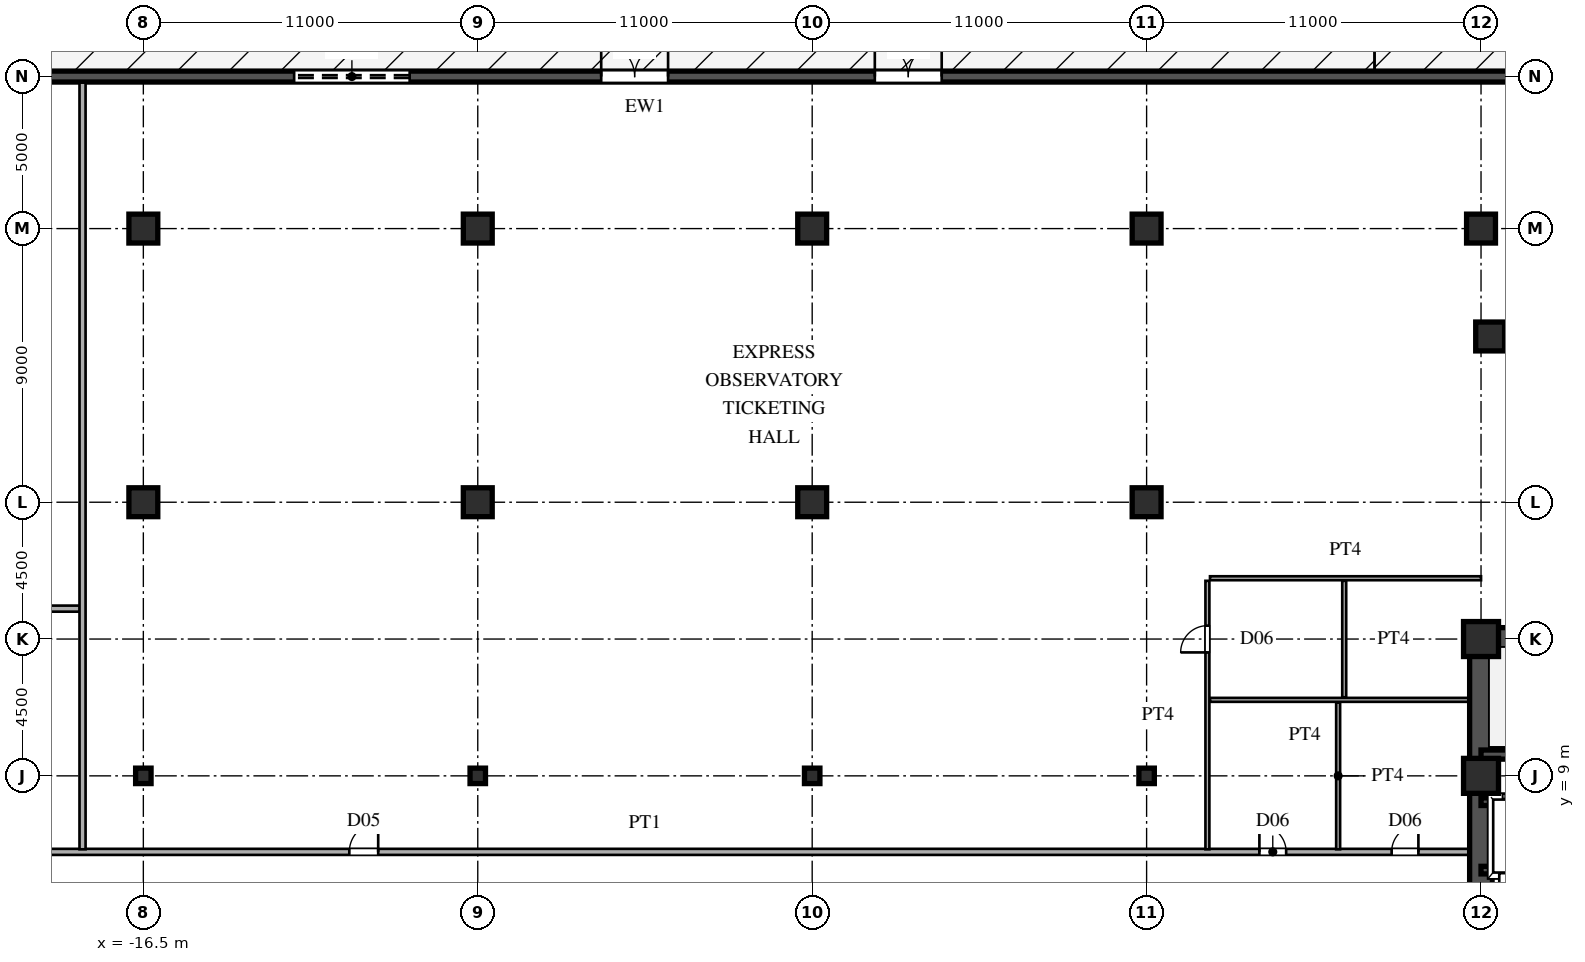
"""IFC4 building model, lengths in metres.
Left out: names, types, materials, properties, quantities, classifications, styles, units other than length and angle.
Written with IfcOpenShell. Run it as: python <this file> out.ifc"""

import sys

from ifc_helpers import new_model, si_unit, direction, frame, frame_2d, origin, origin_2d, place, context, subcontext, project, spatial, rectangle, hollow_rectangle, hollow_circle, extrude, source, transform, mapped, element, fill, save


model = new_model("IFC4")
c1 = context("Model", 3, precision=1e-05, world=origin(), true_north=direction((0.0, 1.0)))
c2 = subcontext(c1, "Body", "Model", "MODEL_VIEW")
j1 = project(units=[si_unit("LENGTHUNIT", "METRE"), si_unit("PLANEANGLEUNIT", "RADIAN")], contexts=[c1])
p1 = place(None, origin())
s1 = spatial("IfcSite", under=j1, at=p1, CompositionType="ELEMENT")
p2 = place(p1, origin())
s2 = spatial("IfcBuilding", under=s1, at=p2, CompositionType="ELEMENT")
p3 = place(p2, origin())
s3 = spatial("IfcBuildingStorey", under=s2, at=p3, CompositionType="ELEMENT", Elevation=0.0)
m1 = source(origin(), c2, "Body", "SweptSolid", [
    extrude(hollow_rectangle(XDim=1.15, YDim=1.15, WallThickness=0.048, at=origin_2d()), origin(), (0.0, 0.0, 1.0), 5.4),
])
for number, where, z_axis, x_axis in (
    (1, (27.5, 9.0, 0.0), (0.0, 0.0, 1.0), (1.0, 0.0, 0.0)),
    (2, (27.5, 13.5, 0.0), (0.0, 0.0, 1.0), (1.0, 0.0, 0.0)),
):
    element("IfcColumn", number, at=place(p3, frame(where, z_axis=z_axis, x_axis=x_axis)), inside=s3, PredefinedType="COLUMN", context=c2, shape_type="MappedRepresentation", body=[
        mapped(m1, transform((0.0, 0.0, 0.0), scale=1.0)),
    ])
m2 = source(origin(), c2, "Body", "SweptSolid", [
    extrude(rectangle(XDim=0.95, YDim=0.95, at=origin_2d()), origin(), (0.0, 0.0, 1.0), 5.4),
])
for number, where, z_axis, x_axis in (
    (3, (27.5, 27.0, 0.0), (0.0, 0.0, 1.0), (1.0, 0.0, 0.0)),
    (4, (27.8, 23.451, 0.0), (0.0, 0.0, 1.0), (1.0, 0.0, 0.0)),
):
    element("IfcColumn", number, at=place(p3, frame(where, z_axis=z_axis, x_axis=x_axis)), inside=s3, PredefinedType="COLUMN", context=c2, shape_type="MappedRepresentation", body=[
        mapped(m2, transform((0.0, 0.0, 0.0), scale=1.0)),
    ])
m3 = source(origin(), c2, "Body", "SweptSolid", [
    extrude(hollow_circle(Radius=0.254, WallThickness=0.019, at=origin_2d()), origin(), (0.0, 0.0, 1.0), 5.4),
])
p4 = place(p3, frame((-16.5, 9.0, 0.0), z_axis=(0.0, 0.0, 1.0), x_axis=(1.0, 0.0, 0.0)))
e5 = element("IfcColumn", 5, at=p4, inside=s3, PredefinedType="COLUMN", context=c2, shape_type="MappedRepresentation", body=[
    mapped(m3, transform((0.0, 0.0, 0.0), scale=1.0)),
])
for number, where, z_axis, x_axis in (
    (6, (-16.5, 18.0, 0.0), (0.0, 0.0, 1.0), (1.0, 0.0, 0.0)),
    (7, (-16.5, 27.0, 0.0), (0.0, 0.0, 1.0), (1.0, 0.0, 0.0)),
):
    element("IfcColumn", number, at=place(p3, frame(where, z_axis=z_axis, x_axis=x_axis)), inside=s3, PredefinedType="COLUMN", context=c2, shape_type="MappedRepresentation", body=[
        mapped(m2, transform((0.0, 0.0, 0.0), scale=1.0)),
    ])
p5 = place(p3, frame((-5.5, 9.0, 0.0), z_axis=(0.0, 0.0, 1.0), x_axis=(1.0, 0.0, 0.0)))
e8 = element("IfcColumn", 8, at=p5, inside=s3, PredefinedType="COLUMN", context=c2, shape_type="MappedRepresentation", body=[
    mapped(m3, transform((0.0, 0.0, 0.0), scale=1.0)),
])
for number, where, z_axis, x_axis in (
    (9, (-5.5, 18.0, 0.0), (0.0, 0.0, 1.0), (1.0, 0.0, 0.0)),
    (10, (-5.5, 27.0, 0.0), (0.0, 0.0, 1.0), (1.0, 0.0, 0.0)),
):
    element("IfcColumn", number, at=place(p3, frame(where, z_axis=z_axis, x_axis=x_axis)), inside=s3, PredefinedType="COLUMN", context=c2, shape_type="MappedRepresentation", body=[
        mapped(m2, transform((0.0, 0.0, 0.0), scale=1.0)),
    ])
p6 = place(p3, frame((5.5, 9.0, 0.0), z_axis=(0.0, 0.0, 1.0), x_axis=(1.0, 0.0, 0.0)))
e11 = element("IfcColumn", 11, at=p6, inside=s3, PredefinedType="COLUMN", context=c2, shape_type="MappedRepresentation", body=[
    mapped(m3, transform((0.0, 0.0, 0.0), scale=1.0)),
])
for number, where, z_axis, x_axis in (
    (12, (5.5, 18.0, 0.0), (0.0, 0.0, 1.0), (1.0, 0.0, 0.0)),
    (13, (5.5, 27.0, 0.0), (0.0, 0.0, 1.0), (1.0, 0.0, 0.0)),
):
    element("IfcColumn", number, at=place(p3, frame(where, z_axis=z_axis, x_axis=x_axis)), inside=s3, PredefinedType="COLUMN", context=c2, shape_type="MappedRepresentation", body=[
        mapped(m2, transform((0.0, 0.0, 0.0), scale=1.0)),
    ])
p7 = place(p3, frame((16.5, 9.0, 0.0), z_axis=(0.0, 0.0, 1.0), x_axis=(1.0, 0.0, 0.0)))
e14 = element("IfcColumn", 14, at=p7, inside=s3, PredefinedType="COLUMN", context=c2, shape_type="MappedRepresentation", body=[
    mapped(m3, transform((0.0, 0.0, 0.0), scale=1.0)),
])
for number, where, z_axis, x_axis in (
    (15, (16.5, 18.0, 0.0), (0.0, 0.0, 1.0), (1.0, 0.0, 0.0)),
    (16, (16.5, 27.0, 0.0), (0.0, 0.0, 1.0), (1.0, 0.0, 0.0)),
):
    element("IfcColumn", number, at=place(p3, frame(where, z_axis=z_axis, x_axis=x_axis)), inside=s3, PredefinedType="COLUMN", context=c2, shape_type="MappedRepresentation", body=[
        mapped(m2, transform((0.0, 0.0, 0.0), scale=1.0)),
    ])
p8 = place(p3, frame((71.96, 32.0, 0.0), z_axis=(0.0, 0.0, 1.0), x_axis=(-1.0, 0.0, 0.0)))
e17 = element("IfcWall", 17, at=p8, inside=s3, PredefinedType="SOLIDWALL", context=c2, shape_type="SweptSolid", body=[
    extrude(rectangle(XDim=143.92, YDim=0.36, at=frame_2d((71.96, 0.0))), origin(), (0.0, 0.0, 1.0), 5.12),
])
p9 = place(p8, frame((18.0, 0.0, 0.0)))
e18 = element("IfcOpeningElement", 18, at=p9, cuts=e17, PredefinedType="OPENING", context=c2, shape_type="SweptSolid", body=[
    extrude(rectangle(XDim=2.2, YDim=2.4, at=frame_2d((1.1, 1.2))), frame((0.0, 0.19, 0.0), z_axis=(0.0, -1.0, 0.0), x_axis=(1.0, 0.0, 0.0)), (0.0, 0.0, 1.0), 0.38),
])
p10 = place(p8, frame((62.2, 0.0, 0.0)))
e19 = element("IfcOpeningElement", 19, at=p10, cuts=e17, PredefinedType="OPENING", context=c2, shape_type="SweptSolid", body=[
    extrude(rectangle(XDim=2.2, YDim=2.4, at=frame_2d((1.1, 1.2))), frame((0.0, 0.19, 0.0), z_axis=(0.0, -1.0, 0.0), x_axis=(1.0, 0.0, 0.0)), (0.0, 0.0, 1.0), 0.38),
])
p11 = place(p8, frame((71.2, 0.0, 0.0)))
e20 = element("IfcOpeningElement", 20, at=p11, cuts=e17, PredefinedType="OPENING", context=c2, shape_type="SweptSolid", body=[
    extrude(rectangle(XDim=2.2, YDim=2.4, at=frame_2d((1.1, 1.2))), frame((0.0, 0.19, 0.0), z_axis=(0.0, -1.0, 0.0), x_axis=(1.0, 0.0, 0.0)), (0.0, 0.0, 1.0), 0.38),
])
p12 = place(p8, frame((79.7, 0.0, 0.0)))
e21 = element("IfcOpeningElement", 21, at=p12, cuts=e17, PredefinedType="OPENING", context=c2, shape_type="SweptSolid", body=[
    extrude(rectangle(XDim=3.8, YDim=3.1, at=frame_2d((1.9, 1.55))), frame((0.0, 0.19, 0.0), z_axis=(0.0, -1.0, 0.0), x_axis=(1.0, 0.0, 0.0)), (0.0, 0.0, 1.0), 0.38),
])
p13 = place(p8, frame((93.2, 0.0, 0.0)))
e22 = element("IfcOpeningElement", 22, at=p13, cuts=e17, PredefinedType="OPENING", context=c2, shape_type="SweptSolid", body=[
    extrude(rectangle(XDim=1.2, YDim=2.2, at=frame_2d((0.6, 1.1))), frame((0.0, 0.19, 0.0), z_axis=(0.0, -1.0, 0.0), x_axis=(1.0, 0.0, 0.0)), (0.0, 0.0, 1.0), 0.38),
])
p14 = place(p8, frame((120.2, 0.0, 0.0)))
e23 = element("IfcOpeningElement", 23, at=p14, cuts=e17, PredefinedType="OPENING", context=c2, shape_type="SweptSolid", body=[
    extrude(rectangle(XDim=2.2, YDim=2.4, at=frame_2d((1.1, 1.2))), frame((0.0, 0.19, 0.0), z_axis=(0.0, -1.0, 0.0), x_axis=(1.0, 0.0, 0.0)), (0.0, 0.0, 1.0), 0.38),
])
p15 = place(p8, frame((95.7, 0.0, 0.95)))
e24 = element("IfcOpeningElement", 24, at=p15, cuts=e17, PredefinedType="OPENING", context=c2, shape_type="SweptSolid", body=[
    extrude(rectangle(XDim=1.2, YDim=1.7, at=frame_2d((0.6, 0.85))), frame((0.0, 0.19, 0.0), z_axis=(0.0, -1.0, 0.0), x_axis=(1.0, 0.0, 0.0)), (0.0, 0.0, 1.0), 0.38),
])
p16 = place(p8, frame((8.0, 0.0, 0.95)))
e25 = element("IfcOpeningElement", 25, at=p16, cuts=e17, PredefinedType="OPENING", context=c2, shape_type="SweptSolid", body=[
    extrude(rectangle(XDim=1.5, YDim=1.9, at=frame_2d((0.75, 0.95))), frame((0.0, 0.19, 0.0), z_axis=(0.0, -1.0, 0.0), x_axis=(1.0, 0.0, 0.0)), (0.0, 0.0, 1.0), 0.38),
])
p17 = place(p8, frame((28.0, 0.0, 0.95)))
e26 = element("IfcOpeningElement", 26, at=p17, cuts=e17, PredefinedType="OPENING", context=c2, shape_type="SweptSolid", body=[
    extrude(rectangle(XDim=1.5, YDim=1.9, at=frame_2d((0.75, 0.95))), frame((0.0, 0.19, 0.0), z_axis=(0.0, -1.0, 0.0), x_axis=(1.0, 0.0, 0.0)), (0.0, 0.0, 1.0), 0.38),
])
p18 = place(p8, frame((36.0, 0.0, 0.95)))
e27 = element("IfcOpeningElement", 27, at=p18, cuts=e17, PredefinedType="OPENING", context=c2, shape_type="SweptSolid", body=[
    extrude(rectangle(XDim=1.5, YDim=1.9, at=frame_2d((0.75, 0.95))), frame((0.0, 0.19, 0.0), z_axis=(0.0, -1.0, 0.0), x_axis=(1.0, 0.0, 0.0)), (0.0, 0.0, 1.0), 0.38),
])
p19 = place(p8, frame((104.0, 0.0, 0.95)))
e28 = element("IfcOpeningElement", 28, at=p19, cuts=e17, PredefinedType="OPENING", context=c2, shape_type="SweptSolid", body=[
    extrude(rectangle(XDim=1.5, YDim=1.9, at=frame_2d((0.75, 0.95))), frame((0.0, 0.19, 0.0), z_axis=(0.0, -1.0, 0.0), x_axis=(1.0, 0.0, 0.0)), (0.0, 0.0, 1.0), 0.38),
])
p20 = place(p8, frame((112.0, 0.0, 0.95)))
e29 = element("IfcOpeningElement", 29, at=p20, cuts=e17, PredefinedType="OPENING", context=c2, shape_type="SweptSolid", body=[
    extrude(rectangle(XDim=1.5, YDim=1.9, at=frame_2d((0.75, 0.95))), frame((0.0, 0.19, 0.0), z_axis=(0.0, -1.0, 0.0), x_axis=(1.0, 0.0, 0.0)), (0.0, 0.0, 1.0), 0.38),
])
p21 = place(p8, frame((130.0, 0.0, 0.95)))
e30 = element("IfcOpeningElement", 30, at=p21, cuts=e17, PredefinedType="OPENING", context=c2, shape_type="SweptSolid", body=[
    extrude(rectangle(XDim=1.5, YDim=1.9, at=frame_2d((0.75, 0.95))), frame((0.0, 0.19, 0.0), z_axis=(0.0, -1.0, 0.0), x_axis=(1.0, 0.0, 0.0)), (0.0, 0.0, 1.0), 0.38),
])
p22 = place(p3, frame((27.5, 1.3, 0.0), z_axis=(0.0, 0.0, 1.0), x_axis=(0.0, 1.0, 0.0)))
e31 = element("IfcWall", 31, at=p22, inside=s3, PredefinedType="SHEAR", context=c2, shape_type="SweptSolid", body=[
    extrude(rectangle(XDim=12.2, YDim=0.75, at=frame_2d((6.1, 0.0))), origin(), (0.0, 0.0, 1.0), 5.12),
])
p23 = place(p3, frame((27.5, 13.5, 0.0), z_axis=(0.0, 0.0, 1.0), x_axis=(1.0, 0.0, 0.0)))
e32 = element("IfcWall", 32, at=p23, inside=s3, PredefinedType="SHEAR", context=c2, shape_type="SweptSolid", body=[
    extrude(rectangle(XDim=9.0, YDim=0.75, at=frame_2d((4.5, 0.0))), origin(), (0.0, 0.0, 1.0), 5.12),
])
p24 = place(p3, frame((27.5, 9.7, 0.0), z_axis=(0.0, 0.0, 1.0), x_axis=(1.0, 0.0, 0.0)))
e33 = element("IfcWall", 33, at=p24, inside=s3, PredefinedType="SHEAR", context=c2, shape_type="SweptSolid", body=[
    extrude(rectangle(XDim=9.0, YDim=0.3, at=frame_2d((4.5, 0.0))), origin(), (0.0, 0.0, 1.0), 5.12),
])
p25 = place(p24, frame((7.3, 0.0, 0.0)))
e34 = element("IfcOpeningElement", 34, at=p25, cuts=e33, PredefinedType="OPENING", context=c2, shape_type="SweptSolid", body=[
    extrude(rectangle(XDim=1.1, YDim=2.2, at=frame_2d((0.55, 1.1))), frame((0.0, 0.16, 0.0), z_axis=(0.0, -1.0, 0.0), x_axis=(1.0, 0.0, 0.0)), (0.0, 0.0, 1.0), 0.32),
])
for number, where, z_axis, x_axis in (
    (35, (27.5, 5.9, 0.0), (0.0, 0.0, 1.0), (1.0, 0.0, 0.0)),
    (36, (27.5, 8.15, 0.0), (0.0, 0.0, 1.0), (1.0, 0.0, 0.0)),
):
    element("IfcWall", number, at=place(p3, frame(where, z_axis=z_axis, x_axis=x_axis)), inside=s3, PredefinedType="SHEAR", context=c2, shape_type="SweptSolid", body=[
        extrude(rectangle(XDim=2.8, YDim=0.25, at=frame_2d((1.4, 0.0))), origin(), (0.0, 0.0, 1.0), 5.12),
    ])
p26 = place(p3, frame((-27.12, 6.5, 0.0), z_axis=(0.0, 0.0, 1.0), x_axis=(1.0, 0.0, 0.0)))
e37 = element("IfcWall", 37, at=p26, inside=s3, PredefinedType="PARTITIONING", context=c2, shape_type="SweptSolid", body=[
    extrude(rectangle(XDim=54.24, YDim=0.2, at=frame_2d((27.12, 0.0))), origin(), (0.0, 0.0, 1.0), 5.12),
])
p27 = place(p26, frame((4.045, 0.0, 0.0)))
e38 = element("IfcOpeningElement", 38, at=p27, cuts=e37, PredefinedType="OPENING", context=c2, shape_type="SweptSolid", body=[
    extrude(rectangle(XDim=1.15, YDim=2.2, at=frame_2d((0.575, 1.1))), frame((0.0, 0.11, 0.0), z_axis=(0.0, -1.0, 0.0), x_axis=(1.0, 0.0, 0.0)), (0.0, 0.0, 1.0), 0.22),
])
p28 = place(p26, frame((17.395, 0.0, 0.0)))
e39 = element("IfcOpeningElement", 39, at=p28, cuts=e37, PredefinedType="OPENING", context=c2, shape_type="SweptSolid", body=[
    extrude(rectangle(XDim=0.95, YDim=2.15, at=frame_2d((0.475, 1.075))), frame((0.0, 0.11, 0.0), z_axis=(0.0, -1.0, 0.0), x_axis=(1.0, 0.0, 0.0)), (0.0, 0.0, 1.0), 0.22),
])
p29 = place(p26, frame((47.33, 0.0, 0.0)))
e40 = element("IfcOpeningElement", 40, at=p29, cuts=e37, PredefinedType="OPENING", context=c2, shape_type="SweptSolid", body=[
    extrude(rectangle(XDim=0.88, YDim=2.1, at=frame_2d((0.44, 1.05))), frame((0.0, 0.11, 0.0), z_axis=(0.0, -1.0, 0.0), x_axis=(1.0, 0.0, 0.0)), (0.0, 0.0, 1.0), 0.22),
])
p30 = place(p26, frame((51.68, 0.0, 0.0)))
e41 = element("IfcOpeningElement", 41, at=p30, cuts=e37, PredefinedType="OPENING", context=c2, shape_type="SweptSolid", body=[
    extrude(rectangle(XDim=0.88, YDim=2.1, at=frame_2d((0.44, 1.05))), frame((0.0, 0.11, 0.0), z_axis=(0.0, -1.0, 0.0), x_axis=(1.0, 0.0, 0.0)), (0.0, 0.0, 1.0), 0.22),
])
p31 = place(p3, frame((18.585, 11.5, 0.0), z_axis=(0.0, 0.0, 1.0), x_axis=(1.0, 0.0, 0.0)))
e42 = element("IfcWall", 42, at=p31, inside=s3, PredefinedType="PARTITIONING", context=c2, shape_type="SweptSolid", body=[
    extrude(rectangle(XDim=8.535, YDim=0.13, at=frame_2d((4.268, 0.0))), origin(), (0.0, 0.0, 1.0), 5.12),
])
p32 = place(p3, frame((-27.5, 14.5, 0.0), z_axis=(0.0, 0.0, 1.0), x_axis=(1.0, 0.0, 0.0)))
e43 = element("IfcWall", 43, at=p32, inside=s3, PredefinedType="PARTITIONING", context=c2, shape_type="SweptSolid", body=[
    extrude(rectangle(XDim=8.915, YDim=0.2, at=frame_2d((4.458, 0.0))), origin(), (0.0, 0.0, 1.0), 5.12),
])
p33 = place(p3, frame((18.585, 15.5, 0.0), z_axis=(0.0, 0.0, 1.0), x_axis=(1.0, 0.0, 0.0)))
e44 = element("IfcWall", 44, at=p33, inside=s3, PredefinedType="PARTITIONING", context=c2, shape_type="SweptSolid", body=[
    extrude(rectangle(XDim=8.915, YDim=0.13, at=frame_2d((4.458, 0.0))), origin(), (0.0, 0.0, 1.0), 5.12),
])
p34 = place(p3, frame((-18.5, 6.585, 0.0), z_axis=(0.0, 0.0, 1.0), x_axis=(0.0, 1.0, 0.0)))
e45 = element("IfcWall", 45, at=p34, inside=s3, PredefinedType="PARTITIONING", context=c2, shape_type="SweptSolid", body=[
    extrude(rectangle(XDim=25.215, YDim=0.2, at=frame_2d((12.607, 0.0))), origin(), (0.0, 0.0, 1.0), 5.12),
])
p35 = place(p3, frame((18.5, 6.585, 0.0), z_axis=(0.0, 0.0, 1.0), x_axis=(0.0, 1.0, 0.0)))
e46 = element("IfcWall", 46, at=p35, inside=s3, PredefinedType="PARTITIONING", context=c2, shape_type="SweptSolid", body=[
    extrude(rectangle(XDim=8.83, YDim=0.13, at=frame_2d((4.415, 0.0))), origin(), (0.0, 0.0, 1.0), 5.12),
])
p36 = place(p35, frame((6.475, 0.0, 0.0)))
e47 = element("IfcOpeningElement", 47, at=p36, cuts=e46, PredefinedType="OPENING", context=c2, shape_type="SweptSolid", body=[
    extrude(rectangle(XDim=0.88, YDim=2.1, at=frame_2d((0.44, 1.05))), frame((0.0, 0.075, 0.0), z_axis=(0.0, -1.0, 0.0), x_axis=(1.0, 0.0, 0.0)), (0.0, 0.0, 1.0), 0.15),
])
p37 = place(p3, frame((22.8, 6.585, 0.0), z_axis=(0.0, 0.0, 1.0), x_axis=(0.0, 1.0, 0.0)))
e48 = element("IfcWall", 48, at=p37, inside=s3, PredefinedType="PARTITIONING", context=c2, shape_type="SweptSolid", body=[
    extrude(rectangle(XDim=4.83, YDim=0.13, at=frame_2d((2.415, 0.0))), origin(), (0.0, 0.0, 1.0), 5.12),
])
p38 = place(p3, frame((23.0, 11.585, 0.0), z_axis=(0.0, 0.0, 1.0), x_axis=(0.0, 1.0, 0.0)))
e49 = element("IfcWall", 49, at=p38, inside=s3, PredefinedType="PARTITIONING", context=c2, shape_type="SweptSolid", body=[
    extrude(rectangle(XDim=3.83, YDim=0.13, at=frame_2d((1.915, 0.0))), origin(), (0.0, 0.0, 1.0), 5.12),
])
m4 = source(origin(), c2, "Body", "SweptSolid", [
    extrude(rectangle(XDim=2.2, YDim=2.4, at=frame_2d((1.1, 1.2))), frame((0.0, 0.025, 0.0), z_axis=(0.0, -1.0, 0.0), x_axis=(1.0, 0.0, 0.0)), (0.0, 0.0, 1.0), 0.05),
])
p39 = place(p10, frame((2.2, 0.0, 0.0), z_axis=(0.0, 0.0, 1.0), x_axis=(-1.0, 0.0, 0.0)))
e50 = element("IfcDoor", 50, at=p39, inside=s3, OperationType="DOUBLE_SWING_LEFT", PredefinedType="DOOR", context=c2, shape_type="MappedRepresentation", body=[
    mapped(m4, transform((0.0, 0.0, 0.0), scale=1.0)),
])
fill(e19, e50)
p40 = place(p11, frame((2.2, 0.0, 0.0), z_axis=(0.0, 0.0, 1.0), x_axis=(-1.0, 0.0, 0.0)))
e51 = element("IfcDoor", 51, at=p40, inside=s3, OperationType="DOUBLE_SWING_LEFT", PredefinedType="DOOR", context=c2, shape_type="MappedRepresentation", body=[
    mapped(m4, transform((0.0, 0.0, 0.0), scale=1.0)),
])
fill(e20, e51)
m5 = source(origin(), c2, "Body", "SweptSolid", [
    extrude(rectangle(XDim=3.8, YDim=3.1, at=frame_2d((1.9, 1.55))), frame((0.0, 0.025, 0.0), z_axis=(0.0, -1.0, 0.0), x_axis=(1.0, 0.0, 0.0)), (0.0, 0.0, 1.0), 0.05),
])
p41 = place(p12, frame((3.8, 0.0, 0.0), z_axis=(0.0, 0.0, 1.0), x_axis=(-1.0, 0.0, 0.0)))
e52 = element("IfcDoor", 52, at=p41, inside=s3, OperationType="ROLLINGUP", PredefinedType="GATE", context=c2, shape_type="MappedRepresentation", body=[
    mapped(m5, transform((0.0, 0.0, 0.0), scale=1.0)),
])
fill(e21, e52)
m6 = source(origin(), c2, "Body", "SweptSolid", [
    extrude(rectangle(XDim=0.95, YDim=2.15, at=frame_2d((0.475, 1.075))), frame((0.0, 0.025, 0.0), z_axis=(0.0, -1.0, 0.0), x_axis=(1.0, 0.0, 0.0)), (0.0, 0.0, 1.0), 0.05),
])
p42 = place(p28, origin())
e53 = element("IfcDoor", 53, at=p42, inside=s3, OperationType="SINGLE_SWING_RIGHT", PredefinedType="DOOR", context=c2, shape_type="MappedRepresentation", body=[
    mapped(m6, transform((0.0, 0.0, 0.0), scale=1.0)),
])
fill(e39, e53)
m7 = source(origin(), c2, "Body", "SweptSolid", [
    extrude(rectangle(XDim=0.88, YDim=2.1, at=frame_2d((0.44, 1.05))), frame((0.0, 0.025, 0.0), z_axis=(0.0, -1.0, 0.0), x_axis=(1.0, 0.0, 0.0)), (0.0, 0.0, 1.0), 0.05),
])
p43 = place(p29, origin())
e54 = element("IfcDoor", 54, at=p43, inside=s3, OperationType="SINGLE_SWING_LEFT", PredefinedType="DOOR", context=c2, shape_type="MappedRepresentation", body=[
    mapped(m7, transform((0.0, 0.0, 0.0), scale=1.0)),
])
fill(e40, e54)
p44 = place(p30, origin())
e55 = element("IfcDoor", 55, at=p44, inside=s3, OperationType="SINGLE_SWING_RIGHT", PredefinedType="DOOR", context=c2, shape_type="MappedRepresentation", body=[
    mapped(m7, transform((0.0, 0.0, 0.0), scale=1.0)),
])
fill(e41, e55)
p45 = place(p36, origin())
e56 = element("IfcDoor", 56, at=p45, inside=s3, OperationType="SINGLE_SWING_LEFT", PredefinedType="DOOR", context=c2, shape_type="MappedRepresentation", body=[
    mapped(m7, transform((0.0, 0.0, 0.0), scale=1.0)),
])
fill(e47, e56)
save(model, sys.argv[1])
